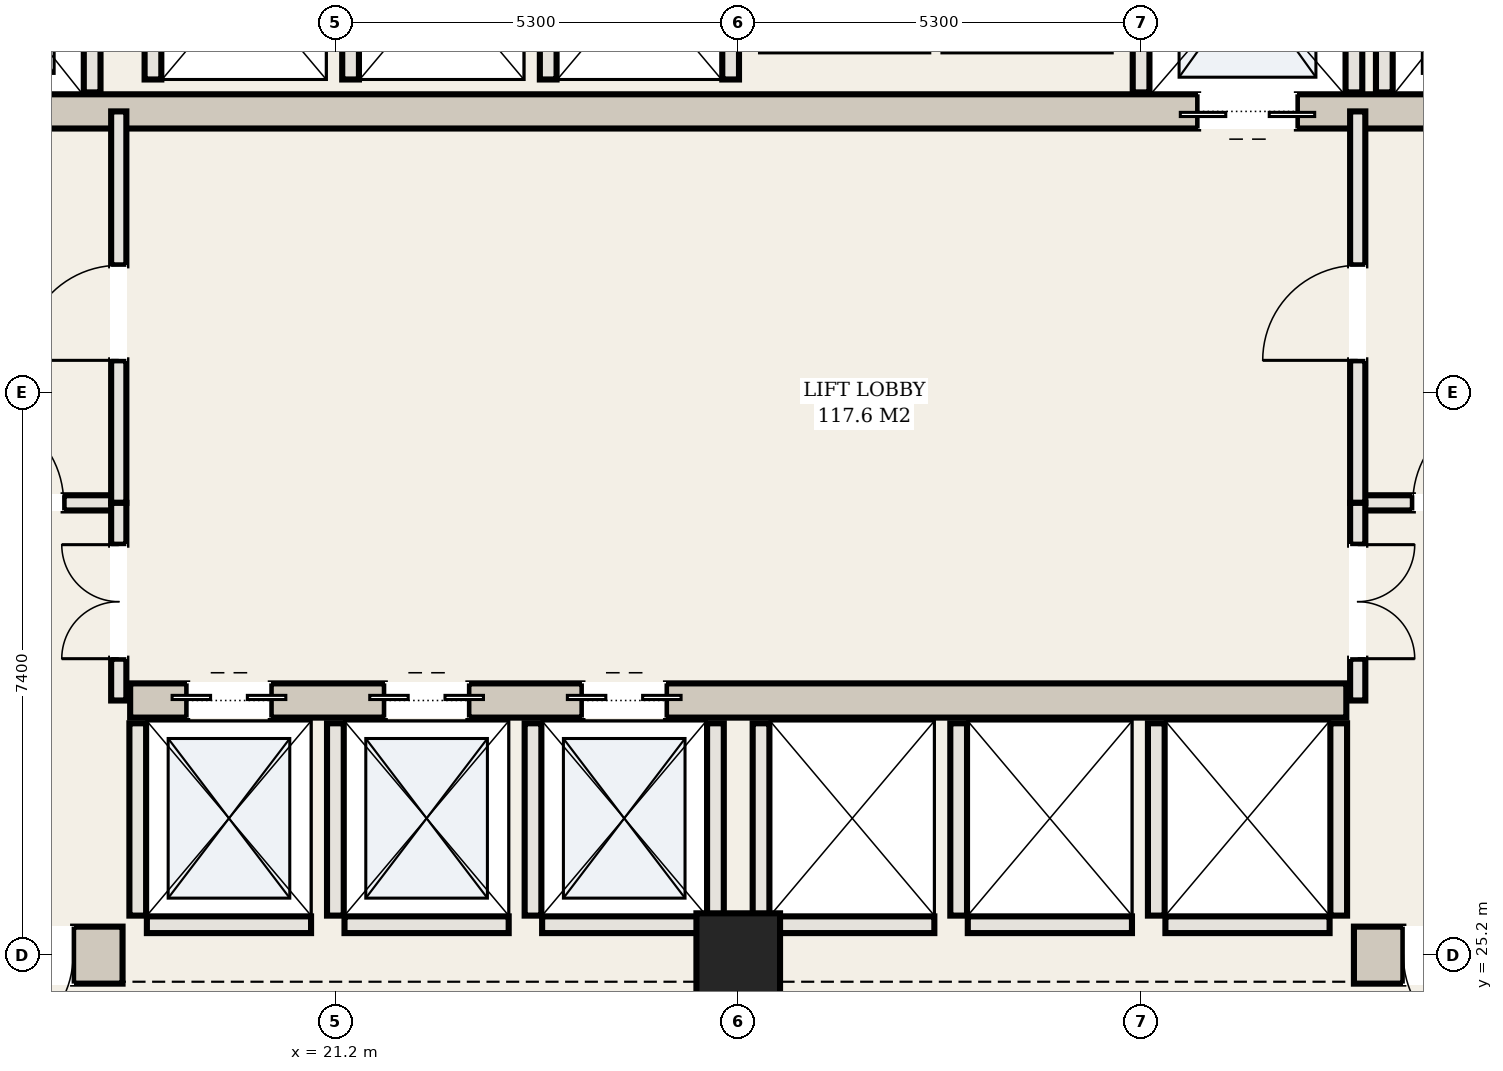
"""IFC4 building model, lengths in metres.
Left out: names, types, materials, properties, quantities, classifications, styles, units other than length and angle.
Written with IfcOpenShell. Run it as: python <this file> out.ifc"""

import sys

from ifc_helpers import new_model, si_unit, direction, frame, frame_2d, origin, origin_2d, place, context, subcontext, project, spatial, rectangle, hollow_rectangle, extrude, element, fill, save


model = new_model("IFC4")
c1 = context("Model", 3, precision=1e-05, world=origin(), true_north=direction((0.0, 1.0)))
c2 = subcontext(c1, "Body", "Model", "MODEL_VIEW")
j1 = project(units=[si_unit("LENGTHUNIT", "METRE"), si_unit("PLANEANGLEUNIT", "RADIAN")], contexts=[c1])
p1 = place(None, origin())
s1 = spatial("IfcSite", under=j1, at=p1, CompositionType="ELEMENT")
p2 = place(p1, origin())
s2 = spatial("IfcBuilding", under=s1, at=p2, CompositionType="ELEMENT")
p3 = place(p2, frame((0.0, 0.0, 70.4)))
s3 = spatial("IfcBuildingStorey", under=s2, at=p3, CompositionType="ELEMENT", Elevation=70.4)
p4 = place(p3, frame((10.225, 25.2, 0.0), z_axis=(0.0, 0.0, 1.0), x_axis=(1.0, 0.0, 0.0)))
e1 = element("IfcWall", 1, at=p4, inside=s3, PredefinedType="SHEAR", context=c2, shape_type="SweptSolid", body=[
    extrude(rectangle(XDim=8.175, YDim=0.75, at=frame_2d((4.087, 0.0))), origin(), (0.0, 0.0, 1.0), 6.56),
])
p5 = place(p4, frame((6.275, 0.0, 0.0)))
e2 = element("IfcOpeningElement", 2, at=p5, cuts=e1, PredefinedType="OPENING", context=c2, shape_type="SweptSolid", body=[
    extrude(rectangle(XDim=1.25, YDim=2.2, at=frame_2d((0.625, 1.1))), frame((0.0, 0.385, 0.0), z_axis=(0.0, -1.0, 0.0), x_axis=(1.0, 0.0, 0.0)), (0.0, 0.0, 1.0), 0.77),
])
p6 = place(p3, frame((34.6, 25.2, 0.0), z_axis=(0.0, 0.0, 1.0), x_axis=(1.0, 0.0, 0.0)))
e3 = element("IfcWall", 3, at=p6, inside=s3, PredefinedType="SHEAR", context=c2, shape_type="SweptSolid", body=[
    extrude(rectangle(XDim=8.175, YDim=0.75, at=frame_2d((4.087, 0.0))), origin(), (0.0, 0.0, 1.0), 6.56),
])
p7 = place(p6, frame((0.65, 0.0, 0.0)))
e4 = element("IfcOpeningElement", 4, at=p7, cuts=e3, PredefinedType="OPENING", context=c2, shape_type="SweptSolid", body=[
    extrude(rectangle(XDim=1.25, YDim=2.2, at=frame_2d((0.625, 1.1))), frame((0.0, 0.385, 0.0), z_axis=(0.0, -1.0, 0.0), x_axis=(1.0, 0.0, 0.0)), (0.0, 0.0, 1.0), 0.77),
])
p8 = place(p3, frame((15.5, 36.3, 0.0), z_axis=(0.0, 0.0, 1.0), x_axis=(1.0, 0.0, 0.0)))
e5 = element("IfcWall", 5, at=p8, inside=s3, PredefinedType="SHEAR", context=c2, shape_type="SweptSolid", body=[
    extrude(rectangle(XDim=22.0, YDim=0.45, at=frame_2d((11.0, 0.0))), origin(), (0.0, 0.0, 1.0), 6.56),
])
p9 = place(p8, frame((0.65, 0.0, 0.0)))
e6 = element("IfcOpeningElement", 6, at=p9, cuts=e5, PredefinedType="OPENING", context=c2, shape_type="SweptSolid", body=[
    extrude(rectangle(XDim=1.1, YDim=2.15, at=frame_2d((0.55, 1.075))), frame((0.0, 0.235, 0.0), z_axis=(0.0, -1.0, 0.0), x_axis=(1.0, 0.0, 0.0)), (0.0, 0.0, 1.0), 0.47),
])
p10 = place(p8, frame((20.25, 0.0, 0.0)))
e7 = element("IfcOpeningElement", 7, at=p10, cuts=e5, PredefinedType="OPENING", context=c2, shape_type="SweptSolid", body=[
    extrude(rectangle(XDim=1.1, YDim=2.15, at=frame_2d((0.55, 1.075))), frame((0.0, 0.235, 0.0), z_axis=(0.0, -1.0, 0.0), x_axis=(1.0, 0.0, 0.0)), (0.0, 0.0, 1.0), 0.47),
])
p11 = place(p8, frame((17.05, 0.0, 0.0)))
e8 = element("IfcOpeningElement", 8, at=p11, cuts=e5, PredefinedType="OPENING", context=c2, shape_type="SweptSolid", body=[
    extrude(rectangle(XDim=1.3, YDim=2.2, at=frame_2d((0.65, 1.1))), frame((0.0, 0.235, 0.0), z_axis=(0.0, -1.0, 0.0), x_axis=(1.0, 0.0, 0.0)), (0.0, 0.0, 1.0), 0.47),
])
p12 = place(p3, frame((18.5, 28.55, 0.0), z_axis=(0.0, 0.0, 1.0), x_axis=(1.0, 0.0, 0.0)))
e9 = element("IfcWall", 9, at=p12, inside=s3, PredefinedType="SHEAR", context=c2, shape_type="SweptSolid", body=[
    extrude(rectangle(XDim=16.0, YDim=0.45, at=frame_2d((8.0, 0.0))), origin(), (0.0, 0.0, 1.0), 6.56),
])
p13 = place(p12, frame((0.75, 0.0, 0.0)))
e10 = element("IfcOpeningElement", 10, at=p13, cuts=e9, PredefinedType="OPENING", context=c2, shape_type="SweptSolid", body=[
    extrude(rectangle(XDim=1.1, YDim=2.15, at=frame_2d((0.55, 1.075))), frame((0.0, 0.235, 0.0), z_axis=(0.0, -1.0, 0.0), x_axis=(1.0, 0.0, 0.0)), (0.0, 0.0, 1.0), 0.47),
])
p14 = place(p12, frame((3.35, 0.0, 0.0)))
e11 = element("IfcOpeningElement", 11, at=p14, cuts=e9, PredefinedType="OPENING", context=c2, shape_type="SweptSolid", body=[
    extrude(rectangle(XDim=1.1, YDim=2.15, at=frame_2d((0.55, 1.075))), frame((0.0, 0.235, 0.0), z_axis=(0.0, -1.0, 0.0), x_axis=(1.0, 0.0, 0.0)), (0.0, 0.0, 1.0), 0.47),
])
p15 = place(p12, frame((5.95, 0.0, 0.0)))
e12 = element("IfcOpeningElement", 12, at=p15, cuts=e9, PredefinedType="OPENING", context=c2, shape_type="SweptSolid", body=[
    extrude(rectangle(XDim=1.1, YDim=2.15, at=frame_2d((0.55, 1.075))), frame((0.0, 0.235, 0.0), z_axis=(0.0, -1.0, 0.0), x_axis=(1.0, 0.0, 0.0)), (0.0, 0.0, 1.0), 0.47),
])
p16 = place(p3, frame((26.5, 25.2, 0.0), z_axis=(0.0, 0.0, 1.0), x_axis=(1.0, 0.0, 0.0)))
e13 = element("IfcColumn", 13, at=p16, inside=s3, PredefinedType="COLUMN", context=c2, shape_type="SweptSolid", body=[
    extrude(hollow_rectangle(XDim=1.1, YDim=1.1, WallThickness=0.036, at=origin_2d()), origin(), (0.0, 0.0, 1.0), 6.8),
])
for number, where, z_axis, x_axis in (
    (14, (18.0, 36.55, 0.0), (0.0, 0.0, 1.0), (0.0, 1.0, 0.0)),
    (15, (35.0, 36.55, 0.0), (0.0, 0.0, 1.0), (0.0, 1.0, 0.0)),
    (16, (31.8, 36.55, 0.0), (0.0, 0.0, 1.0), (0.0, 1.0, 0.0)),
    (17, (34.6, 36.55, 0.0), (0.0, 0.0, 1.0), (0.0, 1.0, 0.0)),
):
    element("IfcWall", number, at=place(p3, frame(where, z_axis=z_axis, x_axis=x_axis)), inside=s3, PredefinedType="SOLIDWALL", context=c2, shape_type="SweptSolid", body=[
        extrude(rectangle(XDim=2.93, YDim=0.22, at=frame_2d((1.465, 0.0))), origin(), (0.0, 0.0, 1.0), 6.56),
    ])
p17 = place(p3, frame((18.6, 25.72, 0.0), z_axis=(0.0, 0.0, 1.0), x_axis=(0.0, 1.0, 0.0)))
e18 = element("IfcWall", 18, at=p17, inside=s3, PredefinedType="SOLIDWALL", context=c2, shape_type="SweptSolid", body=[
    extrude(rectangle(XDim=2.53, YDim=0.22, at=frame_2d((1.265, 0.0))), origin(), (0.0, 0.0, 1.0), 6.56),
])
p18 = place(p3, frame((18.72, 25.6, 0.0), z_axis=(0.0, 0.0, 1.0), x_axis=(1.0, 0.0, 0.0)))
e19 = element("IfcWall", 19, at=p18, inside=s3, PredefinedType="SOLIDWALL", context=c2, shape_type="SweptSolid", body=[
    extrude(rectangle(XDim=2.16, YDim=0.22, at=frame_2d((1.08, 0.0))), origin(), (0.0, 0.0, 1.0), 6.56),
])
p19 = place(p3, frame((21.2, 25.72, 0.0), z_axis=(0.0, 0.0, 1.0), x_axis=(0.0, 1.0, 0.0)))
e20 = element("IfcWall", 20, at=p19, inside=s3, PredefinedType="SOLIDWALL", context=c2, shape_type="SweptSolid", body=[
    extrude(rectangle(XDim=2.53, YDim=0.22, at=frame_2d((1.265, 0.0))), origin(), (0.0, 0.0, 1.0), 6.56),
])
p20 = place(p3, frame((21.32, 25.6, 0.0), z_axis=(0.0, 0.0, 1.0), x_axis=(1.0, 0.0, 0.0)))
e21 = element("IfcWall", 21, at=p20, inside=s3, PredefinedType="SOLIDWALL", context=c2, shape_type="SweptSolid", body=[
    extrude(rectangle(XDim=2.16, YDim=0.22, at=frame_2d((1.08, 0.0))), origin(), (0.0, 0.0, 1.0), 6.56),
])
for number, where, z_axis, x_axis in (
    (22, (23.8, 25.72, 0.0), (0.0, 0.0, 1.0), (0.0, 1.0, 0.0)),
    (23, (26.2, 25.72, 0.0), (0.0, 0.0, 1.0), (0.0, 1.0, 0.0)),
):
    element("IfcWall", number, at=place(p3, frame(where, z_axis=z_axis, x_axis=x_axis)), inside=s3, PredefinedType="SOLIDWALL", context=c2, shape_type="SweptSolid", body=[
        extrude(rectangle(XDim=2.53, YDim=0.22, at=frame_2d((1.265, 0.0))), origin(), (0.0, 0.0, 1.0), 6.56),
    ])
p21 = place(p3, frame((23.92, 25.6, 0.0), z_axis=(0.0, 0.0, 1.0), x_axis=(1.0, 0.0, 0.0)))
e24 = element("IfcWall", 24, at=p21, inside=s3, PredefinedType="SOLIDWALL", context=c2, shape_type="SweptSolid", body=[
    extrude(rectangle(XDim=2.16, YDim=0.22, at=frame_2d((1.08, 0.0))), origin(), (0.0, 0.0, 1.0), 6.56),
])
p22 = place(p3, frame((26.8, 25.72, 0.0), z_axis=(0.0, 0.0, 1.0), x_axis=(0.0, 1.0, 0.0)))
e25 = element("IfcWall", 25, at=p22, inside=s3, PredefinedType="SOLIDWALL", context=c2, shape_type="SweptSolid", body=[
    extrude(rectangle(XDim=2.53, YDim=0.22, at=frame_2d((1.265, 0.0))), origin(), (0.0, 0.0, 1.0), 6.56),
])
p23 = place(p3, frame((26.92, 25.6, 0.0), z_axis=(0.0, 0.0, 1.0), x_axis=(1.0, 0.0, 0.0)))
e26 = element("IfcWall", 26, at=p23, inside=s3, PredefinedType="SOLIDWALL", context=c2, shape_type="SweptSolid", body=[
    extrude(rectangle(XDim=2.16, YDim=0.22, at=frame_2d((1.08, 0.0))), origin(), (0.0, 0.0, 1.0), 6.56),
])
p24 = place(p3, frame((29.4, 25.72, 0.0), z_axis=(0.0, 0.0, 1.0), x_axis=(0.0, 1.0, 0.0)))
e27 = element("IfcWall", 27, at=p24, inside=s3, PredefinedType="SOLIDWALL", context=c2, shape_type="SweptSolid", body=[
    extrude(rectangle(XDim=2.53, YDim=0.22, at=frame_2d((1.265, 0.0))), origin(), (0.0, 0.0, 1.0), 6.56),
])
p25 = place(p3, frame((29.52, 25.6, 0.0), z_axis=(0.0, 0.0, 1.0), x_axis=(1.0, 0.0, 0.0)))
e28 = element("IfcWall", 28, at=p25, inside=s3, PredefinedType="SOLIDWALL", context=c2, shape_type="SweptSolid", body=[
    extrude(rectangle(XDim=2.16, YDim=0.22, at=frame_2d((1.08, 0.0))), origin(), (0.0, 0.0, 1.0), 6.56),
])
for number, where, z_axis, x_axis in (
    (29, (32.0, 25.72, 0.0), (0.0, 0.0, 1.0), (0.0, 1.0, 0.0)),
    (30, (34.4, 25.72, 0.0), (0.0, 0.0, 1.0), (0.0, 1.0, 0.0)),
):
    element("IfcWall", number, at=place(p3, frame(where, z_axis=z_axis, x_axis=x_axis)), inside=s3, PredefinedType="SOLIDWALL", context=c2, shape_type="SweptSolid", body=[
        extrude(rectangle(XDim=2.53, YDim=0.22, at=frame_2d((1.265, 0.0))), origin(), (0.0, 0.0, 1.0), 6.56),
    ])
p26 = place(p3, frame((32.12, 25.6, 0.0), z_axis=(0.0, 0.0, 1.0), x_axis=(1.0, 0.0, 0.0)))
e31 = element("IfcWall", 31, at=p26, inside=s3, PredefinedType="SOLIDWALL", context=c2, shape_type="SweptSolid", body=[
    extrude(rectangle(XDim=2.16, YDim=0.22, at=frame_2d((1.08, 0.0))), origin(), (0.0, 0.0, 1.0), 6.56),
])
for number, where, z_axis, x_axis in (
    (32, (18.8, 36.72, 0.0), (0.0, 0.0, 1.0), (0.0, 1.0, 0.0)),
    (33, (21.4, 36.72, 0.0), (0.0, 0.0, 1.0), (0.0, 1.0, 0.0)),
    (34, (24.0, 36.72, 0.0), (0.0, 0.0, 1.0), (0.0, 1.0, 0.0)),
    (35, (26.4, 36.72, 0.0), (0.0, 0.0, 1.0), (0.0, 1.0, 0.0)),
):
    element("IfcWall", number, at=place(p3, frame(where, z_axis=z_axis, x_axis=x_axis)), inside=s3, PredefinedType="SOLIDWALL", context=c2, shape_type="SweptSolid", body=[
        extrude(rectangle(XDim=2.56, YDim=0.22, at=frame_2d((1.28, 0.0))), origin(), (0.0, 0.0, 1.0), 6.56),
    ])
p27 = place(p3, frame((15.1, 31.15, 0.0), z_axis=(0.0, 0.0, 1.0), x_axis=(1.0, 0.0, 0.0)))
e36 = element("IfcWall", 36, at=p27, inside=s3, PredefinedType="PARTITIONING", context=c2, shape_type="SweptSolid", body=[
    extrude(rectangle(XDim=3.25, YDim=0.2, at=frame_2d((1.625, 0.0))), origin(), (0.0, 0.0, 1.0), 6.56),
])
p28 = place(p27, frame((1.275, 0.0, 0.0)))
e37 = element("IfcOpeningElement", 37, at=p28, cuts=e36, PredefinedType="OPENING", context=c2, shape_type="SweptSolid", body=[
    extrude(rectangle(XDim=1.25, YDim=2.2, at=frame_2d((0.625, 1.1))), frame((0.0, 0.11, 0.0), z_axis=(0.0, -1.0, 0.0), x_axis=(1.0, 0.0, 0.0)), (0.0, 0.0, 1.0), 0.22),
])
p29 = place(p3, frame((18.35, 31.15, 0.0), z_axis=(0.0, 0.0, 1.0), x_axis=(0.0, 1.0, 0.0)))
e38 = element("IfcWall", 38, at=p29, inside=s3, PredefinedType="PARTITIONING", context=c2, shape_type="SweptSolid", body=[
    extrude(rectangle(XDim=5.15, YDim=0.2, at=frame_2d((2.575, 0.0))), origin(), (0.0, 0.0, 1.0), 6.56),
])
p30 = place(p29, frame((1.875, 0.0, 0.0)))
e39 = element("IfcOpeningElement", 39, at=p30, cuts=e38, PredefinedType="OPENING", context=c2, shape_type="SweptSolid", body=[
    extrude(rectangle(XDim=1.25, YDim=2.2, at=frame_2d((0.625, 1.1))), frame((0.0, 0.11, 0.0), z_axis=(0.0, -1.0, 0.0), x_axis=(1.0, 0.0, 0.0)), (0.0, 0.0, 1.0), 0.22),
])
p31 = place(p3, frame((34.65, 31.15, 0.0), z_axis=(0.0, 0.0, 1.0), x_axis=(1.0, 0.0, 0.0)))
e40 = element("IfcWall", 40, at=p31, inside=s3, PredefinedType="PARTITIONING", context=c2, shape_type="SweptSolid", body=[
    extrude(rectangle(XDim=3.25, YDim=0.2, at=frame_2d((1.625, 0.0))), origin(), (0.0, 0.0, 1.0), 6.56),
])
p32 = place(p31, frame((0.725, 0.0, 0.0)))
e41 = element("IfcOpeningElement", 41, at=p32, cuts=e40, PredefinedType="OPENING", context=c2, shape_type="SweptSolid", body=[
    extrude(rectangle(XDim=1.25, YDim=2.2, at=frame_2d((0.625, 1.1))), frame((0.0, 0.11, 0.0), z_axis=(0.0, -1.0, 0.0), x_axis=(1.0, 0.0, 0.0)), (0.0, 0.0, 1.0), 0.22),
])
p33 = place(p3, frame((34.65, 31.15, 0.0), z_axis=(0.0, 0.0, 1.0), x_axis=(0.0, 1.0, 0.0)))
e42 = element("IfcWall", 42, at=p33, inside=s3, PredefinedType="PARTITIONING", context=c2, shape_type="SweptSolid", body=[
    extrude(rectangle(XDim=5.15, YDim=0.2, at=frame_2d((2.575, 0.0))), origin(), (0.0, 0.0, 1.0), 6.56),
])
p34 = place(p33, frame((1.875, 0.0, 0.0)))
e43 = element("IfcOpeningElement", 43, at=p34, cuts=e42, PredefinedType="OPENING", context=c2, shape_type="SweptSolid", body=[
    extrude(rectangle(XDim=1.25, YDim=2.2, at=frame_2d((0.625, 1.1))), frame((0.0, 0.11, 0.0), z_axis=(0.0, -1.0, 0.0), x_axis=(1.0, 0.0, 0.0)), (0.0, 0.0, 1.0), 0.22),
])
p35 = place(p3, frame((18.35, 28.55, 0.0), z_axis=(0.0, 0.0, 1.0), x_axis=(0.0, 1.0, 0.0)))
e44 = element("IfcWall", 44, at=p35, inside=s3, PredefinedType="PARTITIONING", context=c2, shape_type="SweptSolid", body=[
    extrude(rectangle(XDim=2.6, YDim=0.2, at=frame_2d((1.3, 0.0))), origin(), (0.0, 0.0, 1.0), 6.56),
])
p36 = place(p35, frame((0.55, 0.0, 0.0)))
e45 = element("IfcOpeningElement", 45, at=p36, cuts=e44, PredefinedType="OPENING", context=c2, shape_type="SweptSolid", body=[
    extrude(rectangle(XDim=1.5, YDim=2.25, at=frame_2d((0.75, 1.125))), frame((0.0, 0.11, 0.0), z_axis=(0.0, -1.0, 0.0), x_axis=(1.0, 0.0, 0.0)), (0.0, 0.0, 1.0), 0.22),
])
p37 = place(p3, frame((34.65, 28.55, 0.0), z_axis=(0.0, 0.0, 1.0), x_axis=(0.0, 1.0, 0.0)))
e46 = element("IfcWall", 46, at=p37, inside=s3, PredefinedType="PARTITIONING", context=c2, shape_type="SweptSolid", body=[
    extrude(rectangle(XDim=2.6, YDim=0.2, at=frame_2d((1.3, 0.0))), origin(), (0.0, 0.0, 1.0), 6.56),
])
p38 = place(p37, frame((0.55, 0.0, 0.0)))
e47 = element("IfcOpeningElement", 47, at=p38, cuts=e46, PredefinedType="OPENING", context=c2, shape_type="SweptSolid", body=[
    extrude(rectangle(XDim=1.5, YDim=2.25, at=frame_2d((0.75, 1.125))), frame((0.0, 0.11, 0.0), z_axis=(0.0, -1.0, 0.0), x_axis=(1.0, 0.0, 0.0)), (0.0, 0.0, 1.0), 0.22),
])
p39 = place(p11, frame((1.3, 0.0, 0.0), z_axis=(0.0, 0.0, 1.0), x_axis=(-1.0, 0.0, 0.0)))
e48 = element("IfcDoor", 48, at=p39, inside=s3, OperationType="DOUBLE_DOOR_SLIDING", PredefinedType="DOOR", context=c2, shape_type="SweptSolid", body=[
    extrude(rectangle(XDim=1.3, YDim=2.2, at=frame_2d((0.65, 1.1))), frame((0.0, 0.025, 0.0), z_axis=(0.0, -1.0, 0.0), x_axis=(1.0, 0.0, 0.0)), (0.0, 0.0, 1.0), 0.05),
])
fill(e8, e48)
p40 = place(p13, origin())
e49 = element("IfcDoor", 49, at=p40, inside=s3, OperationType="DOUBLE_DOOR_SLIDING", PredefinedType="DOOR", context=c2, shape_type="SweptSolid", body=[
    extrude(rectangle(XDim=1.1, YDim=2.15, at=frame_2d((0.55, 1.075))), frame((0.0, 0.025, 0.0), z_axis=(0.0, -1.0, 0.0), x_axis=(1.0, 0.0, 0.0)), (0.0, 0.0, 1.0), 0.05),
])
fill(e10, e49)
p41 = place(p14, origin())
e50 = element("IfcDoor", 50, at=p41, inside=s3, OperationType="DOUBLE_DOOR_SLIDING", PredefinedType="DOOR", context=c2, shape_type="SweptSolid", body=[
    extrude(rectangle(XDim=1.1, YDim=2.15, at=frame_2d((0.55, 1.075))), frame((0.0, 0.025, 0.0), z_axis=(0.0, -1.0, 0.0), x_axis=(1.0, 0.0, 0.0)), (0.0, 0.0, 1.0), 0.05),
])
fill(e11, e50)
p42 = place(p15, origin())
e51 = element("IfcDoor", 51, at=p42, inside=s3, OperationType="DOUBLE_DOOR_SLIDING", PredefinedType="DOOR", context=c2, shape_type="SweptSolid", body=[
    extrude(rectangle(XDim=1.1, YDim=2.15, at=frame_2d((0.55, 1.075))), frame((0.0, 0.025, 0.0), z_axis=(0.0, -1.0, 0.0), x_axis=(1.0, 0.0, 0.0)), (0.0, 0.0, 1.0), 0.05),
])
fill(e12, e51)
p43 = place(p5, frame((1.25, 0.0, 0.0), z_axis=(0.0, 0.0, 1.0), x_axis=(-1.0, 0.0, 0.0)))
e52 = element("IfcDoor", 52, at=p43, inside=s3, OperationType="SINGLE_SWING_RIGHT", PredefinedType="DOOR", context=c2, shape_type="SweptSolid", body=[
    extrude(rectangle(XDim=1.25, YDim=2.2, at=frame_2d((0.625, 1.1))), frame((0.0, 0.025, 0.0), z_axis=(0.0, -1.0, 0.0), x_axis=(1.0, 0.0, 0.0)), (0.0, 0.0, 1.0), 0.05),
])
fill(e2, e52)
p44 = place(p7, frame((1.25, 0.0, 0.0), z_axis=(0.0, 0.0, 1.0), x_axis=(-1.0, 0.0, 0.0)))
e53 = element("IfcDoor", 53, at=p44, inside=s3, OperationType="SINGLE_SWING_LEFT", PredefinedType="DOOR", context=c2, shape_type="SweptSolid", body=[
    extrude(rectangle(XDim=1.25, YDim=2.2, at=frame_2d((0.625, 1.1))), frame((0.0, 0.025, 0.0), z_axis=(0.0, -1.0, 0.0), x_axis=(1.0, 0.0, 0.0)), (0.0, 0.0, 1.0), 0.05),
])
fill(e4, e53)
p45 = place(p28, origin())
e54 = element("IfcDoor", 54, at=p45, inside=s3, OperationType="SINGLE_SWING_LEFT", PredefinedType="DOOR", context=c2, shape_type="SweptSolid", body=[
    extrude(rectangle(XDim=1.25, YDim=2.2, at=frame_2d((0.625, 1.1))), frame((0.0, 0.025, 0.0), z_axis=(0.0, -1.0, 0.0), x_axis=(1.0, 0.0, 0.0)), (0.0, 0.0, 1.0), 0.05),
])
fill(e37, e54)
p46 = place(p30, origin())
e55 = element("IfcDoor", 55, at=p46, inside=s3, OperationType="SINGLE_SWING_LEFT", PredefinedType="DOOR", context=c2, shape_type="SweptSolid", body=[
    extrude(rectangle(XDim=1.25, YDim=2.2, at=frame_2d((0.625, 1.1))), frame((0.0, 0.025, 0.0), z_axis=(0.0, -1.0, 0.0), x_axis=(1.0, 0.0, 0.0)), (0.0, 0.0, 1.0), 0.05),
])
fill(e39, e55)
p47 = place(p32, origin())
e56 = element("IfcDoor", 56, at=p47, inside=s3, OperationType="SINGLE_SWING_RIGHT", PredefinedType="DOOR", context=c2, shape_type="SweptSolid", body=[
    extrude(rectangle(XDim=1.25, YDim=2.2, at=frame_2d((0.625, 1.1))), frame((0.0, 0.025, 0.0), z_axis=(0.0, -1.0, 0.0), x_axis=(1.0, 0.0, 0.0)), (0.0, 0.0, 1.0), 0.05),
])
fill(e41, e56)
p48 = place(p34, origin())
e57 = element("IfcDoor", 57, at=p48, inside=s3, OperationType="SINGLE_SWING_LEFT", PredefinedType="DOOR", context=c2, shape_type="SweptSolid", body=[
    extrude(rectangle(XDim=1.25, YDim=2.2, at=frame_2d((0.625, 1.1))), frame((0.0, 0.025, 0.0), z_axis=(0.0, -1.0, 0.0), x_axis=(1.0, 0.0, 0.0)), (0.0, 0.0, 1.0), 0.05),
])
fill(e43, e57)
p49 = place(p36, origin())
e58 = element("IfcDoor", 58, at=p49, inside=s3, OperationType="DOUBLE_DOOR_SINGLE_SWING", PredefinedType="DOOR", context=c2, shape_type="SweptSolid", body=[
    extrude(rectangle(XDim=1.5, YDim=2.25, at=frame_2d((0.75, 1.125))), frame((0.0, 0.025, 0.0), z_axis=(0.0, -1.0, 0.0), x_axis=(1.0, 0.0, 0.0)), (0.0, 0.0, 1.0), 0.05),
])
fill(e45, e58)
p50 = place(p38, frame((1.5, 0.0, 0.0), z_axis=(0.0, 0.0, 1.0), x_axis=(-1.0, 0.0, 0.0)))
e59 = element("IfcDoor", 59, at=p50, inside=s3, OperationType="DOUBLE_DOOR_SINGLE_SWING", PredefinedType="DOOR", context=c2, shape_type="SweptSolid", body=[
    extrude(rectangle(XDim=1.5, YDim=2.25, at=frame_2d((0.75, 1.125))), frame((0.0, 0.025, 0.0), z_axis=(0.0, -1.0, 0.0), x_axis=(1.0, 0.0, 0.0)), (0.0, 0.0, 1.0), 0.05),
])
fill(e47, e59)
save(model, sys.argv[1])
